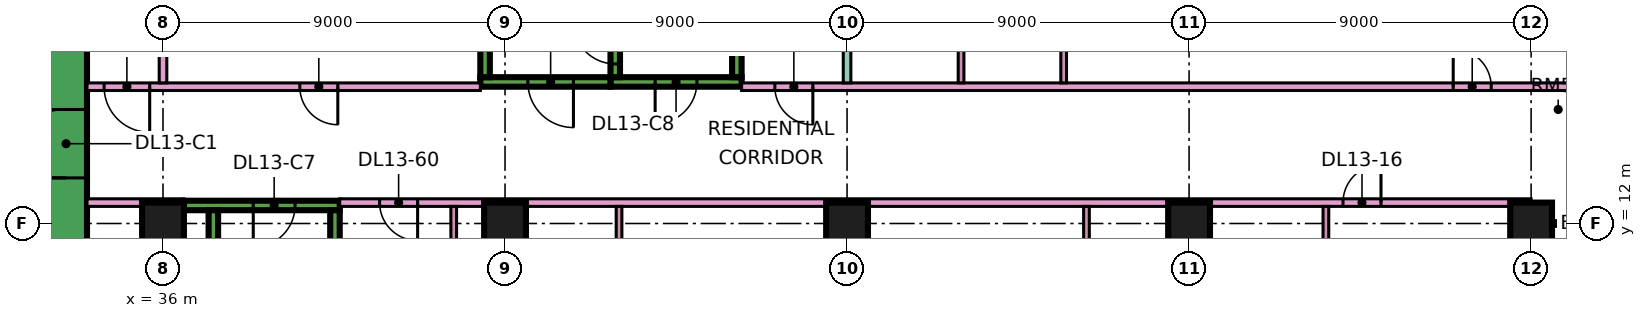
"""IFC4 building model, lengths in metres.
Left out: names, types, materials, properties, quantities, classifications, styles, units other than length and angle.
Written with IfcOpenShell. Run it as: python <this file> out.ifc"""

import sys

from ifc_helpers import new_model, si_unit, direction, frame, frame_2d, origin, origin_2d, place, context, subcontext, project, spatial, rectangle, extrude, element, fill, save


model = new_model("IFC4")
c1 = context("Model", 3, precision=1e-05, world=origin(), true_north=direction((0.0, 1.0)))
c2 = subcontext(c1, "Body", "Model", "MODEL_VIEW")
j1 = project(units=[si_unit("LENGTHUNIT", "METRE"), si_unit("PLANEANGLEUNIT", "RADIAN")], contexts=[c1])
p1 = place(None, origin())
s1 = spatial("IfcSite", under=j1, at=p1, CompositionType="ELEMENT")
p2 = place(p1, origin())
s2 = spatial("IfcBuilding", under=s1, at=p2, CompositionType="ELEMENT")
p3 = place(p2, frame((0.0, 0.0, 63.9)))
s3 = spatial("IfcBuildingStorey", under=s2, at=p3, CompositionType="ELEMENT", Elevation=63.9)
for number, where, z_axis, x_axis in (
    (1, (36.0, 12.0, 0.0), (0.0, 0.0, 1.0), (1.0, 0.0, 0.0)),
    (2, (45.0, 12.0, 0.0), (0.0, 0.0, 1.0), (1.0, 0.0, 0.0)),
    (3, (54.0, 12.0, 0.0), (0.0, 0.0, 1.0), (1.0, 0.0, 0.0)),
    (4, (63.0, 12.0, 0.0), (0.0, 0.0, 1.0), (1.0, 0.0, 0.0)),
    (5, (72.0, 12.0, 0.0), (0.0, 0.0, 1.0), (1.0, 0.0, 0.0)),
):
    element("IfcColumn", number, at=place(p3, frame(where, z_axis=z_axis, x_axis=x_axis)), inside=s3, PredefinedType="COLUMN", context=c2, shape_type="SweptSolid", body=[
        extrude(rectangle(XDim=1.1, YDim=1.1, at=origin_2d()), origin(), (0.0, 0.0, 1.0), 3.75),
    ])
p4 = place(p3, frame((33.45, 8.1, 0.0), z_axis=(0.0, 0.0, 1.0), x_axis=(0.0, 1.0, 0.0)))
e6 = element("IfcWall", 6, at=p4, inside=s3, PredefinedType="SHEAR", context=c2, shape_type="SweptSolid", body=[
    extrude(rectangle(XDim=10.8, YDim=1.1, at=frame_2d((5.4, 0.0))), origin(), (0.0, 0.0, 1.0), 3.75),
])
p5 = place(p4, frame((5.1, 0.0, 0.0)))
e7 = element("IfcOpeningElement", 7, at=p5, cuts=e6, PredefinedType="OPENING", context=c2, shape_type="SweptSolid", body=[
    extrude(rectangle(XDim=1.8, YDim=2.4, at=frame_2d((0.9, 1.2))), frame((0.0, 0.56, 0.0), z_axis=(0.0, -1.0, 0.0), x_axis=(1.0, 0.0, 0.0)), (0.0, 0.0, 1.0), 1.12),
])
p6 = place(p3, frame((36.55, 12.475, 0.0), z_axis=(0.0, 0.0, 1.0), x_axis=(1.0, 0.0, 0.0)))
e8 = element("IfcWall", 8, at=p6, inside=s3, PredefinedType="SHEAR", context=c2, shape_type="SweptSolid", body=[
    extrude(rectangle(XDim=4.1, YDim=0.25, at=frame_2d((2.05, 0.0))), origin(), (0.0, 0.0, 1.0), 3.75),
])
p7 = place(p6, frame((1.825, 0.0, 0.0)))
e9 = element("IfcOpeningElement", 9, at=p7, cuts=e8, PredefinedType="OPENING", context=c2, shape_type="SweptSolid", body=[
    extrude(rectangle(XDim=1.1, YDim=2.2, at=frame_2d((0.55, 1.1))), frame((0.0, 0.135, 0.0), z_axis=(0.0, -1.0, 0.0), x_axis=(1.0, 0.0, 0.0)), (0.0, 0.0, 1.0), 0.27),
])
for number, where, z_axis, x_axis in (
    (10, (37.325, 5.85, 0.0), (0.0, 0.0, 1.0), (0.0, 1.0, 0.0)),
    (11, (40.525, 5.85, 0.0), (0.0, 0.0, 1.0), (0.0, 1.0, 0.0)),
):
    element("IfcWall", number, at=place(p3, frame(where, z_axis=z_axis, x_axis=x_axis)), inside=s3, PredefinedType="SHEAR", context=c2, shape_type="SweptSolid", body=[
        extrude(rectangle(XDim=6.5, YDim=0.25, at=frame_2d((3.25, 0.0))), origin(), (0.0, 0.0, 1.0), 3.75),
    ])
p8 = place(p3, frame((47.775, 15.725, 0.0), z_axis=(0.0, 0.0, 1.0), x_axis=(1.0, 0.0, 0.0)))
e12 = element("IfcWall", 12, at=p8, inside=s3, PredefinedType="SHEAR", context=c2, shape_type="SweptSolid", body=[
    extrude(rectangle(XDim=3.45, YDim=0.25, at=frame_2d((1.725, 0.0))), origin(), (0.0, 0.0, 1.0), 3.75),
])
p9 = place(p8, frame((1.175, 0.0, 0.0)))
e13 = element("IfcOpeningElement", 13, at=p9, cuts=e12, PredefinedType="OPENING", context=c2, shape_type="SweptSolid", body=[
    extrude(rectangle(XDim=1.1, YDim=2.2, at=frame_2d((0.55, 1.1))), frame((0.0, 0.135, 0.0), z_axis=(0.0, -1.0, 0.0), x_axis=(1.0, 0.0, 0.0)), (0.0, 0.0, 1.0), 0.27),
])
p10 = place(p3, frame((47.9, 15.85, 0.0), z_axis=(0.0, 0.0, 1.0), x_axis=(0.0, 1.0, 0.0)))
e14 = element("IfcWall", 14, at=p10, inside=s3, PredefinedType="SHEAR", context=c2, shape_type="SweptSolid", body=[
    extrude(rectangle(XDim=6.5, YDim=0.25, at=frame_2d((3.25, 0.0))), origin(), (0.0, 0.0, 1.0), 3.75),
])
p11 = place(p10, frame((0.35, 0.0, 0.0)))
e15 = element("IfcOpeningElement", 15, at=p11, cuts=e14, PredefinedType="OPENING", context=c2, shape_type="SweptSolid", body=[
    extrude(rectangle(XDim=1.1, YDim=2.2, at=frame_2d((0.55, 1.1))), frame((0.0, 0.135, 0.0), z_axis=(0.0, -1.0, 0.0), x_axis=(1.0, 0.0, 0.0)), (0.0, 0.0, 1.0), 0.27),
])
p12 = place(p3, frame((51.1, 15.85, 0.0), z_axis=(0.0, 0.0, 1.0), x_axis=(0.0, 1.0, 0.0)))
e16 = element("IfcWall", 16, at=p12, inside=s3, PredefinedType="SHEAR", context=c2, shape_type="SweptSolid", body=[
    extrude(rectangle(XDim=6.5, YDim=0.25, at=frame_2d((3.25, 0.0))), origin(), (0.0, 0.0, 1.0), 3.75),
])
p13 = place(p3, frame((44.35, 15.725, 0.0), z_axis=(0.0, 0.0, 1.0), x_axis=(1.0, 0.0, 0.0)))
e17 = element("IfcWall", 17, at=p13, inside=s3, PredefinedType="SHEAR", context=c2, shape_type="SweptSolid", body=[
    extrude(rectangle(XDim=3.425, YDim=0.25, at=frame_2d((1.712, 0.0))), origin(), (0.0, 0.0, 1.0), 3.75),
])
p14 = place(p13, frame((1.25, 0.0, 0.0)))
e18 = element("IfcOpeningElement", 18, at=p14, cuts=e17, PredefinedType="OPENING", context=c2, shape_type="SweptSolid", body=[
    extrude(rectangle(XDim=1.2, YDim=2.2, at=frame_2d((0.6, 1.1))), frame((0.0, 0.135, 0.0), z_axis=(0.0, -1.0, 0.0), x_axis=(1.0, 0.0, 0.0)), (0.0, 0.0, 1.0), 0.27),
])
p15 = place(p3, frame((44.475, 15.85, 0.0), z_axis=(0.0, 0.0, 1.0), x_axis=(0.0, 1.0, 0.0)))
e19 = element("IfcWall", 19, at=p15, inside=s3, PredefinedType="SHEAR", context=c2, shape_type="SweptSolid", body=[
    extrude(rectangle(XDim=6.5, YDim=0.25, at=frame_2d((3.25, 0.0))), origin(), (0.0, 0.0, 1.0), 3.75),
])
p16 = place(p15, frame((1.75, 0.0, 0.0)))
e20 = element("IfcOpeningElement", 20, at=p16, cuts=e19, PredefinedType="OPENING", context=c2, shape_type="SweptSolid", body=[
    extrude(rectangle(XDim=1.1, YDim=2.2, at=frame_2d((0.55, 1.1))), frame((0.0, 0.135, 0.0), z_axis=(0.0, -1.0, 0.0), x_axis=(1.0, 0.0, 0.0)), (0.0, 0.0, 1.0), 0.27),
])
p17 = place(p15, frame((4.3, 0.0, 0.0)))
e21 = element("IfcOpeningElement", 21, at=p17, cuts=e19, PredefinedType="OPENING", context=c2, shape_type="SweptSolid", body=[
    extrude(rectangle(XDim=1.1, YDim=2.2, at=frame_2d((0.55, 1.1))), frame((0.0, 0.135, 0.0), z_axis=(0.0, -1.0, 0.0), x_axis=(1.0, 0.0, 0.0)), (0.0, 0.0, 1.0), 0.27),
])
p18 = place(p3, frame((72.0, 1.575, 0.0), z_axis=(0.0, 0.0, 1.0), x_axis=(0.0, 1.0, 0.0)))
e22 = element("IfcWall", 22, at=p18, inside=s3, PredefinedType="SOLIDWALL", context=c2, shape_type="SweptSolid", body=[
    extrude(rectangle(XDim=10.35, YDim=0.15, at=frame_2d((5.175, 0.0))), origin(), (0.0, 0.0, 1.0), 3.35),
])
p19 = place(p18, frame((1.587, 0.0, 0.0)))
e23 = element("IfcOpeningElement", 23, at=p19, cuts=e22, PredefinedType="OPENING", context=c2, shape_type="SweptSolid", body=[
    extrude(rectangle(XDim=1.8, YDim=2.4, at=frame_2d((0.9, 1.2))), frame((0.0, 0.085, 0.0), z_axis=(0.0, -1.0, 0.0), x_axis=(1.0, 0.0, 0.0)), (0.0, 0.0, 1.0), 0.17),
])
p20 = place(p18, frame((5.875, 0.0, 0.45)))
e24 = element("IfcOpeningElement", 24, at=p20, cuts=e22, PredefinedType="OPENING", context=c2, shape_type="SweptSolid", body=[
    extrude(rectangle(XDim=3.0, YDim=2.4, at=frame_2d((1.5, 1.2))), frame((0.0, 0.085, 0.0), z_axis=(0.0, -1.0, 0.0), x_axis=(1.0, 0.0, 0.0)), (0.0, 0.0, 1.0), 0.17),
])
p21 = place(p3, frame((73.5, 12.0, 0.0), z_axis=(0.0, 0.0, 1.0), x_axis=(-1.0, 0.0, 0.0)))
e25 = element("IfcWall", 25, at=p21, inside=s3, PredefinedType="SOLIDWALL", context=c2, shape_type="SweptSolid", body=[
    extrude(rectangle(XDim=1.5, YDim=0.15, at=frame_2d((0.75, 0.0))), origin(), (0.0, 0.0, 1.0), 3.35),
])
p22 = place(p3, frame((34.0, 12.55, 0.0), z_axis=(0.0, 0.0, 1.0), x_axis=(1.0, 0.0, 0.0)))
e26 = element("IfcWall", 26, at=p22, inside=s3, PredefinedType="PARTITIONING", context=c2, shape_type="SweptSolid", body=[
    extrude(rectangle(XDim=2.551, YDim=0.2, at=frame_2d((1.275, 0.0))), origin(), (0.0, 0.0, 1.0), 3.35),
])
p23 = place(p3, frame((34.0, 15.6, 0.0), z_axis=(0.0, 0.0, 1.0), x_axis=(1.0, 0.0, 0.0)))
e27 = element("IfcWall", 27, at=p23, inside=s3, PredefinedType="PARTITIONING", context=c2, shape_type="SweptSolid", body=[
    extrude(rectangle(XDim=10.35, YDim=0.2, at=frame_2d((5.175, 0.0))), origin(), (0.0, 0.0, 1.0), 3.35),
])
p24 = place(p23, frame((5.6, 0.0, 0.0)))
e28 = element("IfcOpeningElement", 28, at=p24, cuts=e27, PredefinedType="OPENING", context=c2, shape_type="SweptSolid", body=[
    extrude(rectangle(XDim=1.0, YDim=2.1, at=frame_2d((0.5, 1.05))), frame((0.0, 0.11, 0.0), z_axis=(0.0, -1.0, 0.0), x_axis=(1.0, 0.0, 0.0)), (0.0, 0.0, 1.0), 0.22),
])
p25 = place(p23, frame((0.45, 0.0, 0.0)))
e29 = element("IfcOpeningElement", 29, at=p25, cuts=e27, PredefinedType="OPENING", context=c2, shape_type="SweptSolid", body=[
    extrude(rectangle(XDim=1.2, YDim=2.1, at=frame_2d((0.6, 1.05))), frame((0.0, 0.11, 0.0), z_axis=(0.0, -1.0, 0.0), x_axis=(1.0, 0.0, 0.0)), (0.0, 0.0, 1.0), 0.22),
])
p26 = place(p3, frame((36.0, 15.7, 0.0), z_axis=(0.0, 0.0, 1.0), x_axis=(0.0, 1.0, 0.0)))
e30 = element("IfcWall", 30, at=p26, inside=s3, PredefinedType="PARTITIONING", context=c2, shape_type="SweptSolid", body=[
    extrude(rectangle(XDim=8.3, YDim=0.2, at=frame_2d((4.15, 0.0))), origin(), (0.0, 0.0, 1.0), 3.35),
])
p27 = place(p3, frame((40.65, 12.55, 0.0), z_axis=(0.0, 0.0, 1.0), x_axis=(1.0, 0.0, 0.0)))
e31 = element("IfcWall", 31, at=p27, inside=s3, PredefinedType="PARTITIONING", context=c2, shape_type="SweptSolid", body=[
    extrude(rectangle(XDim=31.35, YDim=0.2, at=frame_2d((15.675, 0.0))), origin(), (0.0, 0.0, 1.0), 3.35),
])
p28 = place(p27, frame((26.4, 0.0, 0.0)))
e32 = element("IfcOpeningElement", 32, at=p28, cuts=e31, PredefinedType="OPENING", context=c2, shape_type="SweptSolid", body=[
    extrude(rectangle(XDim=1.0, YDim=2.1, at=frame_2d((0.5, 1.05))), frame((0.0, 0.11, 0.0), z_axis=(0.0, -1.0, 0.0), x_axis=(1.0, 0.0, 0.0)), (0.0, 0.0, 1.0), 0.22),
])
p29 = place(p27, frame((1.05, 0.0, 0.0)))
e33 = element("IfcOpeningElement", 33, at=p29, cuts=e31, PredefinedType="OPENING", context=c2, shape_type="SweptSolid", body=[
    extrude(rectangle(XDim=1.0, YDim=2.1, at=frame_2d((0.5, 1.05))), frame((0.0, 0.11, 0.0), z_axis=(0.0, -1.0, 0.0), x_axis=(1.0, 0.0, 0.0)), (0.0, 0.0, 1.0), 0.22),
])
p30 = place(p3, frame((43.65, 5.975, 0.0), z_axis=(0.0, 0.0, 1.0), x_axis=(0.0, 1.0, 0.0)))
e34 = element("IfcWall", 34, at=p30, inside=s3, PredefinedType="PARTITIONING", context=c2, shape_type="SweptSolid", body=[
    extrude(rectangle(XDim=6.475, YDim=0.15, at=frame_2d((3.237, 0.0))), origin(), (0.0, 0.0, 1.0), 3.35),
])
p31 = place(p30, frame((4.275, 0.0, 0.0)))
e35 = element("IfcOpeningElement", 35, at=p31, cuts=e34, PredefinedType="OPENING", context=c2, shape_type="SweptSolid", body=[
    extrude(rectangle(XDim=0.9, YDim=2.1, at=frame_2d((0.45, 1.05))), frame((0.0, 0.085, 0.0), z_axis=(0.0, -1.0, 0.0), x_axis=(1.0, 0.0, 0.0)), (0.0, 0.0, 1.0), 0.17),
])
p32 = place(p3, frame((48.0, 5.975, 0.0), z_axis=(0.0, 0.0, 1.0), x_axis=(0.0, 1.0, 0.0)))
e36 = element("IfcWall", 36, at=p32, inside=s3, PredefinedType="PARTITIONING", context=c2, shape_type="SweptSolid", body=[
    extrude(rectangle(XDim=6.475, YDim=0.15, at=frame_2d((3.237, 0.0))), origin(), (0.0, 0.0, 1.0), 3.35),
])
p33 = place(p3, frame((51.225, 15.6, 0.0), z_axis=(0.0, 0.0, 1.0), x_axis=(1.0, 0.0, 0.0)))
e37 = element("IfcWall", 37, at=p33, inside=s3, PredefinedType="PARTITIONING", context=c2, shape_type="SweptSolid", body=[
    extrude(rectangle(XDim=22.125, YDim=0.2, at=frame_2d((11.062, 0.0))), origin(), (0.0, 0.0, 1.0), 3.35),
])
p34 = place(p33, frame((18.725, 0.0, 0.0)))
e38 = element("IfcOpeningElement", 38, at=p34, cuts=e37, PredefinedType="OPENING", context=c2, shape_type="SweptSolid", body=[
    extrude(rectangle(XDim=1.0, YDim=2.1, at=frame_2d((0.5, 1.05))), frame((0.0, 0.11, 0.0), z_axis=(0.0, -1.0, 0.0), x_axis=(1.0, 0.0, 0.0)), (0.0, 0.0, 1.0), 0.22),
])
p35 = place(p33, frame((0.875, 0.0, 0.0)))
e39 = element("IfcOpeningElement", 39, at=p35, cuts=e37, PredefinedType="OPENING", context=c2, shape_type="SweptSolid", body=[
    extrude(rectangle(XDim=1.0, YDim=2.1, at=frame_2d((0.5, 1.05))), frame((0.0, 0.11, 0.0), z_axis=(0.0, -1.0, 0.0), x_axis=(1.0, 0.0, 0.0)), (0.0, 0.0, 1.0), 0.22),
])
p36 = place(p3, frame((54.0, 0.074, 0.0), z_axis=(0.0, 0.0, 1.0), x_axis=(0.0, 1.0, 0.0)))
e40 = element("IfcWall", 40, at=p36, inside=s3, PredefinedType="PARTITIONING", context=c2, shape_type="SweptSolid", body=[
    extrude(rectangle(XDim=12.376, YDim=0.2, at=frame_2d((6.188, 0.0))), origin(), (0.0, 0.0, 1.0), 3.35),
])
p37 = place(p3, frame((54.0, 15.7, 0.0), z_axis=(0.0, 0.0, 1.0), x_axis=(0.0, 1.0, 0.0)))
e41 = element("IfcWall", 41, at=p37, inside=s3, PredefinedType="PARTITIONING", context=c2, shape_type="SweptSolid", body=[
    extrude(rectangle(XDim=8.226, YDim=0.2, at=frame_2d((4.113, 0.0))), origin(), (0.0, 0.0, 1.0), 3.35),
])
p38 = place(p3, frame((57.0, 15.7, 0.0), z_axis=(0.0, 0.0, 1.0), x_axis=(0.0, 1.0, 0.0)))
e42 = element("IfcWall", 42, at=p38, inside=s3, PredefinedType="PARTITIONING", context=c2, shape_type="SweptSolid", body=[
    extrude(rectangle(XDim=2.825, YDim=0.15, at=frame_2d((1.413, 0.0))), origin(), (0.0, 0.0, 1.0), 3.35),
])
p39 = place(p3, frame((59.7, 15.7, 0.0), z_axis=(0.0, 0.0, 1.0), x_axis=(0.0, 1.0, 0.0)))
e43 = element("IfcWall", 43, at=p39, inside=s3, PredefinedType="PARTITIONING", context=c2, shape_type="SweptSolid", body=[
    extrude(rectangle(XDim=2.825, YDim=0.15, at=frame_2d((1.413, 0.0))), origin(), (0.0, 0.0, 1.0), 3.35),
])
p40 = place(p39, frame((1.05, 0.0, 0.0)))
e44 = element("IfcOpeningElement", 44, at=p40, cuts=e43, PredefinedType="OPENING", context=c2, shape_type="SweptSolid", body=[
    extrude(rectangle(XDim=0.8, YDim=2.1, at=frame_2d((0.4, 1.05))), frame((0.0, 0.085, 0.0), z_axis=(0.0, -1.0, 0.0), x_axis=(1.0, 0.0, 0.0)), (0.0, 0.0, 1.0), 0.17),
])
for number, where, z_axis, x_axis in (
    (45, (60.3, 7.825, 0.0), (0.0, 0.0, 1.0), (0.0, 1.0, 0.0)),
    (46, (62.7, 7.825, 0.0), (0.0, 0.0, 1.0), (0.0, 1.0, 0.0)),
    (47, (66.6, 7.825, 0.0), (0.0, 0.0, 1.0), (0.0, 1.0, 0.0)),
):
    element("IfcWall", number, at=place(p3, frame(where, z_axis=z_axis, x_axis=x_axis)), inside=s3, PredefinedType="PARTITIONING", context=c2, shape_type="SweptSolid", body=[
        extrude(rectangle(XDim=4.625, YDim=0.15, at=frame_2d((2.312, 0.0))), origin(), (0.0, 0.0, 1.0), 3.35),
    ])
p41 = place(p5, origin())
e48 = element("IfcDoor", 48, at=p41, inside=s3, OperationType="DOUBLE_DOOR_SINGLE_SWING", PredefinedType="DOOR", context=c2, shape_type="SweptSolid", body=[
    extrude(rectangle(XDim=1.8, YDim=2.4, at=frame_2d((0.9, 1.2))), frame((0.0, 0.025, 0.0), z_axis=(0.0, -1.0, 0.0), x_axis=(1.0, 0.0, 0.0)), (0.0, 0.0, 1.0), 0.05),
])
fill(e7, e48)
p42 = place(p7, frame((1.1, 0.0, 0.0), z_axis=(0.0, 0.0, 1.0), x_axis=(-1.0, 0.0, 0.0)))
e49 = element("IfcDoor", 49, at=p42, inside=s3, OperationType="SINGLE_SWING_LEFT", PredefinedType="DOOR", context=c2, shape_type="SweptSolid", body=[
    extrude(rectangle(XDim=1.1, YDim=2.2, at=frame_2d((0.55, 1.1))), frame((0.0, 0.025, 0.0), z_axis=(0.0, -1.0, 0.0), x_axis=(1.0, 0.0, 0.0)), (0.0, 0.0, 1.0), 0.05),
])
fill(e9, e49)
p43 = place(p9, frame((1.1, 0.0, 0.0), z_axis=(0.0, 0.0, 1.0), x_axis=(-1.0, 0.0, 0.0)))
e50 = element("IfcDoor", 50, at=p43, inside=s3, OperationType="SINGLE_SWING_LEFT", PredefinedType="DOOR", context=c2, shape_type="SweptSolid", body=[
    extrude(rectangle(XDim=1.1, YDim=2.2, at=frame_2d((0.55, 1.1))), frame((0.0, 0.025, 0.0), z_axis=(0.0, -1.0, 0.0), x_axis=(1.0, 0.0, 0.0)), (0.0, 0.0, 1.0), 0.05),
])
fill(e13, e50)
p44 = place(p14, origin())
e51 = element("IfcDoor", 51, at=p44, inside=s3, OperationType="SINGLE_SWING_RIGHT", PredefinedType="DOOR", context=c2, shape_type="SweptSolid", body=[
    extrude(rectangle(XDim=1.2, YDim=2.2, at=frame_2d((0.6, 1.1))), frame((0.0, 0.025, 0.0), z_axis=(0.0, -1.0, 0.0), x_axis=(1.0, 0.0, 0.0)), (0.0, 0.0, 1.0), 0.05),
])
fill(e18, e51)
p45 = place(p11, frame((1.1, 0.0, 0.0), z_axis=(0.0, 0.0, 1.0), x_axis=(-1.0, 0.0, 0.0)))
e52 = element("IfcDoor", 52, at=p45, inside=s3, OperationType="SINGLE_SWING_RIGHT", PredefinedType="DOOR", context=c2, shape_type="SweptSolid", body=[
    extrude(rectangle(XDim=1.1, YDim=2.2, at=frame_2d((0.55, 1.1))), frame((0.0, 0.025, 0.0), z_axis=(0.0, -1.0, 0.0), x_axis=(1.0, 0.0, 0.0)), (0.0, 0.0, 1.0), 0.05),
])
fill(e15, e52)
p46 = place(p24, origin())
e53 = element("IfcDoor", 53, at=p46, inside=s3, OperationType="SINGLE_SWING_RIGHT", PredefinedType="DOOR", context=c2, shape_type="SweptSolid", body=[
    extrude(rectangle(XDim=1.0, YDim=2.1, at=frame_2d((0.5, 1.05))), frame((0.0, 0.025, 0.0), z_axis=(0.0, -1.0, 0.0), x_axis=(1.0, 0.0, 0.0)), (0.0, 0.0, 1.0), 0.05),
])
fill(e28, e53)
p47 = place(p34, origin())
e54 = element("IfcDoor", 54, at=p47, inside=s3, OperationType="SINGLE_SWING_LEFT", PredefinedType="DOOR", context=c2, shape_type="SweptSolid", body=[
    extrude(rectangle(XDim=1.0, YDim=2.1, at=frame_2d((0.5, 1.05))), frame((0.0, 0.025, 0.0), z_axis=(0.0, -1.0, 0.0), x_axis=(1.0, 0.0, 0.0)), (0.0, 0.0, 1.0), 0.05),
])
fill(e38, e54)
p48 = place(p28, frame((1.0, 0.0, 0.0), z_axis=(0.0, 0.0, 1.0), x_axis=(-1.0, 0.0, 0.0)))
e55 = element("IfcDoor", 55, at=p48, inside=s3, OperationType="SINGLE_SWING_RIGHT", PredefinedType="DOOR", context=c2, shape_type="SweptSolid", body=[
    extrude(rectangle(XDim=1.0, YDim=2.1, at=frame_2d((0.5, 1.05))), frame((0.0, 0.025, 0.0), z_axis=(0.0, -1.0, 0.0), x_axis=(1.0, 0.0, 0.0)), (0.0, 0.0, 1.0), 0.05),
])
fill(e32, e55)
p49 = place(p25, origin())
e56 = element("IfcDoor", 56, at=p49, inside=s3, OperationType="SINGLE_SWING_RIGHT", PredefinedType="DOOR", context=c2, shape_type="SweptSolid", body=[
    extrude(rectangle(XDim=1.2, YDim=2.1, at=frame_2d((0.6, 1.05))), frame((0.0, 0.025, 0.0), z_axis=(0.0, -1.0, 0.0), x_axis=(1.0, 0.0, 0.0)), (0.0, 0.0, 1.0), 0.05),
])
fill(e29, e56)
p50 = place(p35, origin())
e57 = element("IfcDoor", 57, at=p50, inside=s3, OperationType="SINGLE_SWING_RIGHT", PredefinedType="DOOR", context=c2, shape_type="SweptSolid", body=[
    extrude(rectangle(XDim=1.0, YDim=2.1, at=frame_2d((0.5, 1.05))), frame((0.0, 0.025, 0.0), z_axis=(0.0, -1.0, 0.0), x_axis=(1.0, 0.0, 0.0)), (0.0, 0.0, 1.0), 0.05),
])
fill(e39, e57)
p51 = place(p29, origin())
e58 = element("IfcDoor", 58, at=p51, inside=s3, OperationType="SINGLE_SWING_RIGHT", PredefinedType="DOOR", context=c2, shape_type="SweptSolid", body=[
    extrude(rectangle(XDim=1.0, YDim=2.1, at=frame_2d((0.5, 1.05))), frame((0.0, 0.025, 0.0), z_axis=(0.0, -1.0, 0.0), x_axis=(1.0, 0.0, 0.0)), (0.0, 0.0, 1.0), 0.05),
])
fill(e33, e58)
save(model, sys.argv[1])
